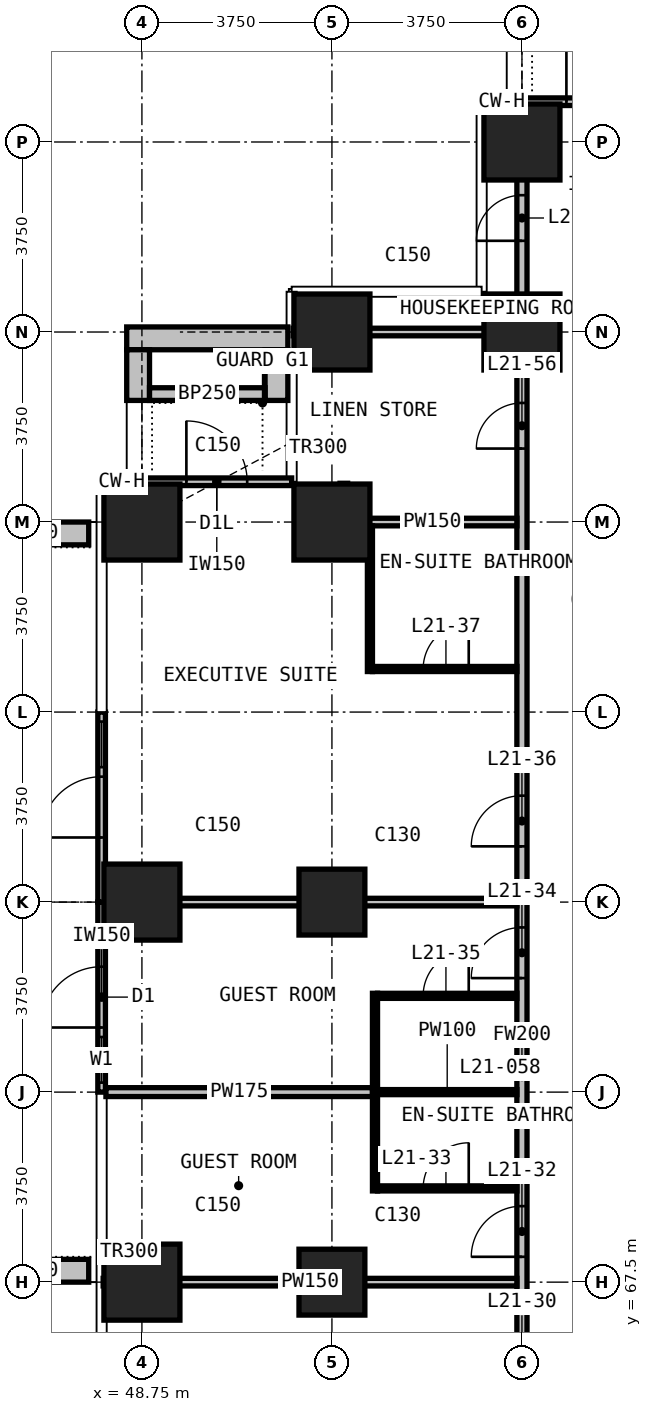
"""IFC4 building model, lengths in metres.
Left out: names, types, materials, properties, quantities, classifications, styles, units other than length and angle.
Written with IfcOpenShell. Run it as: python <this file> out.ifc"""

import sys

from ifc_helpers import new_model, si_unit, direction, frame, frame_2d, origin, origin_2d, place, context, subcontext, project, spatial, rectangle, extrude, element, fill, save


model = new_model("IFC4")
c1 = context("Model", 3, precision=1e-05, world=origin(), true_north=direction((0.0, 1.0)))
c2 = subcontext(c1, "Body", "Model", "MODEL_VIEW")
j1 = project(units=[si_unit("LENGTHUNIT", "METRE"), si_unit("PLANEANGLEUNIT", "RADIAN")], contexts=[c1])
p1 = place(None, origin())
s1 = spatial("IfcSite", under=j1, at=p1, CompositionType="ELEMENT")
p2 = place(p1, origin())
s2 = spatial("IfcBuilding", under=s1, at=p2, CompositionType="ELEMENT")
p3 = place(p2, frame((0.0, 0.0, 89.0)))
s3 = spatial("IfcBuildingStorey", under=s2, at=p3, CompositionType="ELEMENT", Elevation=89.0)
for number, where, z_axis, x_axis in (
    (1, (48.75, 67.5, 0.0), (0.0, 0.0, 1.0), (1.0, 0.0, 0.0)),
    (2, (48.75, 75.0, 0.0), (0.0, 0.0, 1.0), (1.0, 0.0, 0.0)),
    (3, (48.75, 82.5, 0.0), (0.0, 0.0, 1.0), (1.0, 0.0, 0.0)),
):
    element("IfcColumn", number, at=place(p3, frame(where, z_axis=z_axis, x_axis=x_axis)), inside=s3, PredefinedType="COLUMN", context=c2, shape_type="SweptSolid", body=[
        extrude(rectangle(XDim=1.5, YDim=1.5, at=origin_2d()), origin(), (0.0, 0.0, 1.0), 3.3),
    ])
for number, where, z_axis, x_axis in (
    (4, (52.5, 67.5, 0.0), (0.0, 0.0, 1.0), (1.0, 0.0, 0.0)),
    (5, (52.5, 75.0, 0.0), (0.0, 0.0, 1.0), (1.0, 0.0, 0.0)),
):
    element("IfcColumn", number, at=place(p3, frame(where, z_axis=z_axis, x_axis=x_axis)), inside=s3, PredefinedType="COLUMN", context=c2, shape_type="SweptSolid", body=[
        extrude(rectangle(XDim=1.3, YDim=1.3, at=origin_2d()), origin(), (0.0, 0.0, 1.0), 3.3),
    ])
for number, where, z_axis, x_axis in (
    (6, (52.5, 82.5, 0.0), (0.0, 0.0, 1.0), (1.0, 0.0, 0.0)),
    (7, (52.5, 86.25, 0.0), (0.0, 0.0, 1.0), (1.0, 0.0, 0.0)),
    (8, (56.25, 86.25, 0.0), (0.0, 0.0, 1.0), (1.0, 0.0, 0.0)),
    (9, (56.25, 90.0, 0.0), (0.0, 0.0, 1.0), (1.0, 0.0, 0.0)),
):
    element("IfcColumn", number, at=place(p3, frame(where, z_axis=z_axis, x_axis=x_axis)), inside=s3, PredefinedType="COLUMN", context=c2, shape_type="SweptSolid", body=[
        extrude(rectangle(XDim=1.5, YDim=1.5, at=origin_2d()), origin(), (0.0, 0.0, 1.0), 3.3),
    ])
p4 = place(p3, frame((56.25, 90.795, 0.0), z_axis=(0.0, 0.0, 1.0), x_axis=(1.0, 0.0, 0.0)))
e10 = element("IfcWall", 10, at=p4, inside=s3, PredefinedType="SOLIDWALL", context=c2, shape_type="SweptSolid", body=[
    extrude(rectangle(XDim=2.955, YDim=0.15, at=frame_2d((1.478, 0.0))), origin(), (0.0, 0.0, 1.0), 3.0),
])
p5 = place(p4, frame((0.877, 0.0, 0.0)))
e11 = element("IfcOpeningElement", 11, at=p5, cuts=e10, PredefinedType="OPENING", context=c2, shape_type="SweptSolid", body=[
    extrude(rectangle(XDim=1.2, YDim=2.4, at=frame_2d((0.6, 1.2))), frame((0.0, 0.085, 0.0), z_axis=(0.0, -1.0, 0.0), x_axis=(1.0, 0.0, 0.0)), (0.0, 0.0, 1.0), 0.17),
])
p6 = place(p3, frame((48.75, 83.295, 0.0), z_axis=(0.0, 0.0, 1.0), x_axis=(1.0, 0.0, 0.0)))
e12 = element("IfcWall", 12, at=p6, inside=s3, PredefinedType="SOLIDWALL", context=c2, shape_type="SweptSolid", body=[
    extrude(rectangle(XDim=2.955, YDim=0.15, at=frame_2d((1.478, 0.0))), origin(), (0.0, 0.0, 1.0), 3.0),
])
p7 = place(p6, frame((0.877, 0.0, 0.0)))
e13 = element("IfcOpeningElement", 13, at=p7, cuts=e12, PredefinedType="OPENING", context=c2, shape_type="SweptSolid", body=[
    extrude(rectangle(XDim=1.2, YDim=2.0, at=frame_2d((0.6, 1.0))), frame((0.0, 0.085, 0.0), z_axis=(0.0, -1.0, 0.0), x_axis=(1.0, 0.0, 0.0)), (0.0, 0.0, 1.0), 0.17),
])
p8 = place(p3, frame((47.955, 71.25, 0.0), z_axis=(0.0, 0.0, 1.0), x_axis=(0.0, 1.0, 0.0)))
e14 = element("IfcWall", 14, at=p8, inside=s3, PredefinedType="SOLIDWALL", context=c2, shape_type="SweptSolid", body=[
    extrude(rectangle(XDim=3.75, YDim=0.15, at=frame_2d((1.875, 0.0))), origin(), (0.0, 0.0, 1.0), 3.0),
])
p9 = place(p8, frame((0.188, 0.0, 0.1)))
e15 = element("IfcOpeningElement", 15, at=p9, cuts=e14, PredefinedType="OPENING", context=c2, shape_type="SweptSolid", body=[
    extrude(rectangle(XDim=0.9, YDim=2.4, at=frame_2d((0.45, 1.2))), frame((0.0, 0.085, 0.0), z_axis=(0.0, -1.0, 0.0), x_axis=(1.0, 0.0, 0.0)), (0.0, 0.0, 1.0), 0.17),
])
p10 = place(p8, frame((1.275, 0.0, 0.0)))
e16 = element("IfcOpeningElement", 16, at=p10, cuts=e14, PredefinedType="OPENING", context=c2, shape_type="SweptSolid", body=[
    extrude(rectangle(XDim=1.2, YDim=2.4, at=frame_2d((0.6, 1.2))), frame((0.0, 0.085, 0.0), z_axis=(0.0, -1.0, 0.0), x_axis=(1.0, 0.0, 0.0)), (0.0, 0.0, 1.0), 0.17),
])
p11 = place(p3, frame((47.955, 75.0, 0.0), z_axis=(0.0, 0.0, 1.0), x_axis=(0.0, 1.0, 0.0)))
e17 = element("IfcWall", 17, at=p11, inside=s3, PredefinedType="SOLIDWALL", context=c2, shape_type="SweptSolid", body=[
    extrude(rectangle(XDim=3.75, YDim=0.15, at=frame_2d((1.875, 0.0))), origin(), (0.0, 0.0, 1.0), 3.0),
])
p12 = place(p11, frame((1.275, 0.0, 0.0)))
e18 = element("IfcOpeningElement", 18, at=p12, cuts=e17, PredefinedType="OPENING", context=c2, shape_type="SweptSolid", body=[
    extrude(rectangle(XDim=1.2, YDim=2.4, at=frame_2d((0.6, 1.2))), frame((0.0, 0.085, 0.0), z_axis=(0.0, -1.0, 0.0), x_axis=(1.0, 0.0, 0.0)), (0.0, 0.0, 1.0), 0.17),
])
p13 = place(p11, frame((2.663, 0.0, 0.1)))
e19 = element("IfcOpeningElement", 19, at=p13, cuts=e17, PredefinedType="OPENING", context=c2, shape_type="SweptSolid", body=[
    extrude(rectangle(XDim=0.9, YDim=2.4, at=frame_2d((0.45, 1.2))), frame((0.0, 0.085, 0.0), z_axis=(0.0, -1.0, 0.0), x_axis=(1.0, 0.0, 0.0)), (0.0, 0.0, 1.0), 0.17),
])
p14 = place(p3, frame((48.45, 86.125, 0.0), z_axis=(0.0, 0.0, 1.0), x_axis=(1.0, 0.0, 0.0)))
e20 = element("IfcWall", 20, at=p14, inside=s3, PredefinedType="USERDEFINED", context=c2, shape_type="SweptSolid", body=[
    extrude(rectangle(XDim=3.18, YDim=0.45, at=frame_2d((1.59, 0.0))), origin(), (0.0, 0.0, 1.0), 1.1),
])
for number, where, z_axis, x_axis in (
    (21, (48.675, 84.9, 0.0), (0.0, 0.0, 1.0), (0.0, 1.0, 0.0)),
    (22, (51.405, 84.9, 0.0), (0.0, 0.0, 1.0), (0.0, 1.0, 0.0)),
):
    element("IfcWall", number, at=place(p3, frame(where, z_axis=z_axis, x_axis=x_axis)), inside=s3, PredefinedType="USERDEFINED", context=c2, shape_type="SweptSolid", body=[
        extrude(rectangle(XDim=1.0, YDim=0.45, at=frame_2d((0.5, 0.0))), origin(), (0.0, 0.0, 1.0), 1.1),
    ])
p15 = place(p3, frame((48.9, 85.025, 0.0), z_axis=(0.0, 0.0, 1.0), x_axis=(1.0, 0.0, 0.0)))
e23 = element("IfcWall", 23, at=p15, inside=s3, PredefinedType="USERDEFINED", context=c2, shape_type="SweptSolid", body=[
    extrude(rectangle(XDim=2.28, YDim=0.25, at=frame_2d((1.14, 0.0))), origin(), (0.0, 0.0, 1.0), 1.0),
])
for number, where, z_axis, x_axis in (
    (24, (47.7, 67.725, 0.0), (0.0, 0.0, 1.0), (-1.0, 0.0, 0.0)),
    (25, (47.7, 82.275, 0.0), (0.0, 0.0, 1.0), (-1.0, 0.0, 0.0)),
):
    element("IfcWall", number, at=place(p3, frame(where, z_axis=z_axis, x_axis=x_axis)), inside=s3, PredefinedType="USERDEFINED", context=c2, shape_type="SweptSolid", body=[
        extrude(rectangle(XDim=2.35, YDim=0.45, at=frame_2d((1.175, 0.0))), origin(), (0.0, 0.0, 1.0), 1.1),
    ])
p16 = place(p3, frame((56.25, 52.4, 0.0), z_axis=(0.0, 0.0, 1.0), x_axis=(0.0, 1.0, 0.0)))
e26 = element("IfcWall", 26, at=p16, inside=s3, PredefinedType="PARTITIONING", context=c2, shape_type="SweptSolid", body=[
    extrude(rectangle(XDim=38.31, YDim=0.2, at=frame_2d((19.155, 0.0))), origin(), (0.0, 0.0, 1.0), 3.0),
])
p17 = place(p16, frame((2.35, 0.0, 0.0)))
e27 = element("IfcOpeningElement", 27, at=p17, cuts=e26, PredefinedType="OPENING", context=c2, shape_type="SweptSolid", body=[
    extrude(rectangle(XDim=1.0, YDim=2.2, at=frame_2d((0.5, 1.1))), frame((0.0, 0.11, 0.0), z_axis=(0.0, -1.0, 0.0), x_axis=(1.0, 0.0, 0.0)), (0.0, 0.0, 1.0), 0.22),
])
p18 = place(p16, frame((4.35, 0.0, 0.0)))
e28 = element("IfcOpeningElement", 28, at=p18, cuts=e26, PredefinedType="OPENING", context=c2, shape_type="SweptSolid", body=[
    extrude(rectangle(XDim=1.0, YDim=2.2, at=frame_2d((0.5, 1.1))), frame((0.0, 0.11, 0.0), z_axis=(0.0, -1.0, 0.0), x_axis=(1.0, 0.0, 0.0)), (0.0, 0.0, 1.0), 0.22),
])
p19 = place(p16, frame((13.0, 0.0, 0.0)))
e29 = element("IfcOpeningElement", 29, at=p19, cuts=e26, PredefinedType="OPENING", context=c2, shape_type="SweptSolid", body=[
    extrude(rectangle(XDim=1.0, YDim=2.2, at=frame_2d((0.5, 1.1))), frame((0.0, 0.11, 0.0), z_axis=(0.0, -1.0, 0.0), x_axis=(1.0, 0.0, 0.0)), (0.0, 0.0, 1.0), 0.22),
])
p20 = place(p16, frame((15.6, 0.0, 0.0)))
e30 = element("IfcOpeningElement", 30, at=p20, cuts=e26, PredefinedType="OPENING", context=c2, shape_type="SweptSolid", body=[
    extrude(rectangle(XDim=1.0, YDim=2.2, at=frame_2d((0.5, 1.1))), frame((0.0, 0.11, 0.0), z_axis=(0.0, -1.0, 0.0), x_axis=(1.0, 0.0, 0.0)), (0.0, 0.0, 1.0), 0.22),
])
p21 = place(p16, frame((21.1, 0.0, 0.0)))
e31 = element("IfcOpeningElement", 31, at=p21, cuts=e26, PredefinedType="OPENING", context=c2, shape_type="SweptSolid", body=[
    extrude(rectangle(XDim=1.0, YDim=2.2, at=frame_2d((0.5, 1.1))), frame((0.0, 0.11, 0.0), z_axis=(0.0, -1.0, 0.0), x_axis=(1.0, 0.0, 0.0)), (0.0, 0.0, 1.0), 0.22),
])
p22 = place(p16, frame((23.7, 0.0, 0.0)))
e32 = element("IfcOpeningElement", 32, at=p22, cuts=e26, PredefinedType="OPENING", context=c2, shape_type="SweptSolid", body=[
    extrude(rectangle(XDim=1.0, YDim=2.2, at=frame_2d((0.5, 1.1))), frame((0.0, 0.11, 0.0), z_axis=(0.0, -1.0, 0.0), x_axis=(1.0, 0.0, 0.0)), (0.0, 0.0, 1.0), 0.22),
])
p23 = place(p16, frame((31.55, 0.0, 0.0)))
e33 = element("IfcOpeningElement", 33, at=p23, cuts=e26, PredefinedType="OPENING", context=c2, shape_type="SweptSolid", body=[
    extrude(rectangle(XDim=0.9, YDim=2.2, at=frame_2d((0.45, 1.1))), frame((0.0, 0.11, 0.0), z_axis=(0.0, -1.0, 0.0), x_axis=(1.0, 0.0, 0.0)), (0.0, 0.0, 1.0), 0.22),
])
p24 = place(p16, frame((35.65, 0.0, 0.0)))
e34 = element("IfcOpeningElement", 34, at=p24, cuts=e26, PredefinedType="OPENING", context=c2, shape_type="SweptSolid", body=[
    extrude(rectangle(XDim=0.9, YDim=2.2, at=frame_2d((0.45, 1.1))), frame((0.0, 0.11, 0.0), z_axis=(0.0, -1.0, 0.0), x_axis=(1.0, 0.0, 0.0)), (0.0, 0.0, 1.0), 0.22),
])
p25 = place(p3, frame((48.04, 71.25, 0.0), z_axis=(0.0, 0.0, 1.0), x_axis=(1.0, 0.0, 0.0)))
e35 = element("IfcWall", 35, at=p25, inside=s3, PredefinedType="PARTITIONING", context=c2, shape_type="SweptSolid", body=[
    extrude(rectangle(XDim=5.26, YDim=0.175, at=frame_2d((2.63, 0.0))), origin(), (0.0, 0.0, 1.0), 3.0),
])
p26 = place(p3, frame((47.985, 67.5, 0.0), z_axis=(0.0, 0.0, 1.0), x_axis=(1.0, 0.0, 0.0)))
e36 = element("IfcWall", 36, at=p26, inside=s3, PredefinedType="PARTITIONING", context=c2, shape_type="SweptSolid", body=[
    extrude(rectangle(XDim=8.165, YDim=0.15, at=frame_2d((4.083, 0.0))), origin(), (0.0, 0.0, 1.0), 3.0),
])
p27 = place(p3, frame((48.04, 75.0, 0.0), z_axis=(0.0, 0.0, 1.0), x_axis=(1.0, 0.0, 0.0)))
e37 = element("IfcWall", 37, at=p27, inside=s3, PredefinedType="PARTITIONING", context=c2, shape_type="SweptSolid", body=[
    extrude(rectangle(XDim=8.11, YDim=0.15, at=frame_2d((4.055, 0.0))), origin(), (0.0, 0.0, 1.0), 3.0),
])
p28 = place(p3, frame((52.81, 82.5, 0.0), z_axis=(0.0, 0.0, 1.0), x_axis=(1.0, 0.0, 0.0)))
e38 = element("IfcWall", 38, at=p28, inside=s3, PredefinedType="PARTITIONING", context=c2, shape_type="SweptSolid", body=[
    extrude(rectangle(XDim=3.34, YDim=0.15, at=frame_2d((1.67, 0.0))), origin(), (0.0, 0.0, 1.0), 3.0),
])
p29 = place(p3, frame((51.735, 86.25, 0.0), z_axis=(0.0, 0.0, 1.0), x_axis=(1.0, 0.0, 0.0)))
e39 = element("IfcWall", 39, at=p29, inside=s3, PredefinedType="PARTITIONING", context=c2, shape_type="SweptSolid", body=[
    extrude(rectangle(XDim=4.415, YDim=0.15, at=frame_2d((2.208, 0.0))), origin(), (0.0, 0.0, 1.0), 3.0),
])
p30 = place(p3, frame((52.735, 82.425, 0.0), z_axis=(0.0, 0.0, 1.0), x_axis=(0.0, 1.0, 0.0)))
e40 = element("IfcWall", 40, at=p30, inside=s3, PredefinedType="PARTITIONING", context=c2, shape_type="SweptSolid", body=[
    extrude(rectangle(XDim=0.84, YDim=0.15, at=frame_2d((0.42, 0.0))), origin(), (0.0, 0.0, 1.0), 3.0),
])
p31 = place(p3, frame((53.4, 69.35, 0.0), z_axis=(0.0, 0.0, 1.0), x_axis=(1.0, 0.0, 0.0)))
e41 = element("IfcWall", 41, at=p31, inside=s3, PredefinedType="PARTITIONING", context=c2, shape_type="SweptSolid", body=[
    extrude(rectangle(XDim=2.75, YDim=0.1, at=frame_2d((1.375, 0.0))), origin(), (0.0, 0.0, 1.0), 3.0),
])
p32 = place(p31, frame((0.9, 0.0, 0.0)))
e42 = element("IfcOpeningElement", 42, at=p32, cuts=e41, PredefinedType="OPENING", context=c2, shape_type="SweptSolid", body=[
    extrude(rectangle(XDim=0.9, YDim=2.2, at=frame_2d((0.45, 1.1))), frame((0.0, 0.06, 0.0), z_axis=(0.0, -1.0, 0.0), x_axis=(1.0, 0.0, 0.0)), (0.0, 0.0, 1.0), 0.12),
])
p33 = place(p3, frame((53.4, 71.25, 0.0), z_axis=(0.0, 0.0, 1.0), x_axis=(1.0, 0.0, 0.0)))
e43 = element("IfcWall", 43, at=p33, inside=s3, PredefinedType="PARTITIONING", context=c2, shape_type="SweptSolid", body=[
    extrude(rectangle(XDim=2.75, YDim=0.1, at=frame_2d((1.375, 0.0))), origin(), (0.0, 0.0, 1.0), 3.0),
])
p34 = place(p3, frame((53.4, 73.15, 0.0), z_axis=(0.0, 0.0, 1.0), x_axis=(1.0, 0.0, 0.0)))
e44 = element("IfcWall", 44, at=p34, inside=s3, PredefinedType="PARTITIONING", context=c2, shape_type="SweptSolid", body=[
    extrude(rectangle(XDim=2.75, YDim=0.1, at=frame_2d((1.375, 0.0))), origin(), (0.0, 0.0, 1.0), 3.0),
])
p35 = place(p34, frame((0.9, 0.0, 0.0)))
e45 = element("IfcOpeningElement", 45, at=p35, cuts=e44, PredefinedType="OPENING", context=c2, shape_type="SweptSolid", body=[
    extrude(rectangle(XDim=0.9, YDim=2.2, at=frame_2d((0.45, 1.1))), frame((0.0, 0.06, 0.0), z_axis=(0.0, -1.0, 0.0), x_axis=(1.0, 0.0, 0.0)), (0.0, 0.0, 1.0), 0.12),
])
p36 = place(p3, frame((53.3, 79.6, 0.0), z_axis=(0.0, 0.0, 1.0), x_axis=(1.0, 0.0, 0.0)))
e46 = element("IfcWall", 46, at=p36, inside=s3, PredefinedType="PARTITIONING", context=c2, shape_type="SweptSolid", body=[
    extrude(rectangle(XDim=2.85, YDim=0.1, at=frame_2d((1.425, 0.0))), origin(), (0.0, 0.0, 1.0), 3.0),
])
p37 = place(p36, frame((1.0, 0.0, 0.0)))
e47 = element("IfcOpeningElement", 47, at=p37, cuts=e46, PredefinedType="OPENING", context=c2, shape_type="SweptSolid", body=[
    extrude(rectangle(XDim=0.9, YDim=2.2, at=frame_2d((0.45, 1.1))), frame((0.0, 0.06, 0.0), z_axis=(0.0, -1.0, 0.0), x_axis=(1.0, 0.0, 0.0)), (0.0, 0.0, 1.0), 0.12),
])
p38 = place(p3, frame((53.25, 79.55, 0.0), z_axis=(0.0, 0.0, 1.0), x_axis=(0.0, 1.0, 0.0)))
e48 = element("IfcWall", 48, at=p38, inside=s3, PredefinedType="PARTITIONING", context=c2, shape_type="SweptSolid", body=[
    extrude(rectangle(XDim=2.875, YDim=0.1, at=frame_2d((1.438, 0.0))), origin(), (0.0, 0.0, 1.0), 3.0),
])
p39 = place(p3, frame((53.35, 69.3, 0.0), z_axis=(0.0, 0.0, 1.0), x_axis=(0.0, 1.0, 0.0)))
e49 = element("IfcWall", 49, at=p39, inside=s3, PredefinedType="PARTITIONING", context=c2, shape_type="SweptSolid", body=[
    extrude(rectangle(XDim=3.9, YDim=0.1, at=frame_2d((1.95, 0.0))), origin(), (0.0, 0.0, 1.0), 3.0),
])
p40 = place(p5, origin())
e50 = element("IfcDoor", 50, at=p40, inside=s3, OperationType="SINGLE_SWING_LEFT", PredefinedType="DOOR", context=c2, shape_type="SweptSolid", body=[
    extrude(rectangle(XDim=1.2, YDim=2.4, at=frame_2d((0.6, 1.2))), frame((0.0, 0.025, 0.0), z_axis=(0.0, -1.0, 0.0), x_axis=(1.0, 0.0, 0.0)), (0.0, 0.0, 1.0), 0.05),
])
fill(e11, e50)
p41 = place(p7, origin())
e51 = element("IfcDoor", 51, at=p41, inside=s3, OperationType="SINGLE_SWING_LEFT", PredefinedType="DOOR", context=c2, shape_type="SweptSolid", body=[
    extrude(rectangle(XDim=1.2, YDim=2.0, at=frame_2d((0.6, 1.0))), frame((0.0, 0.025, 0.0), z_axis=(0.0, -1.0, 0.0), x_axis=(1.0, 0.0, 0.0)), (0.0, 0.0, 1.0), 0.05),
])
fill(e13, e51)
p42 = place(p9, origin())
e52 = element("IfcWindow", 52, at=p42, inside=s3, PartitioningType="SINGLE_PANEL", PredefinedType="WINDOW", context=c2, shape_type="SweptSolid", body=[
    extrude(rectangle(XDim=0.9, YDim=2.4, at=frame_2d((0.45, 1.2))), frame((0.0, 0.03, 0.0), z_axis=(0.0, -1.0, 0.0), x_axis=(1.0, 0.0, 0.0)), (0.0, 0.0, 1.0), 0.06),
])
fill(e15, e52)
p43 = place(p10, origin())
e53 = element("IfcDoor", 53, at=p43, inside=s3, OperationType="SINGLE_SWING_LEFT", PredefinedType="DOOR", context=c2, shape_type="SweptSolid", body=[
    extrude(rectangle(XDim=1.2, YDim=2.4, at=frame_2d((0.6, 1.2))), frame((0.0, 0.025, 0.0), z_axis=(0.0, -1.0, 0.0), x_axis=(1.0, 0.0, 0.0)), (0.0, 0.0, 1.0), 0.05),
])
fill(e16, e53)
p44 = place(p12, origin())
e54 = element("IfcDoor", 54, at=p44, inside=s3, OperationType="SINGLE_SWING_LEFT", PredefinedType="DOOR", context=c2, shape_type="SweptSolid", body=[
    extrude(rectangle(XDim=1.2, YDim=2.4, at=frame_2d((0.6, 1.2))), frame((0.0, 0.025, 0.0), z_axis=(0.0, -1.0, 0.0), x_axis=(1.0, 0.0, 0.0)), (0.0, 0.0, 1.0), 0.05),
])
fill(e18, e54)
p45 = place(p13, origin())
e55 = element("IfcWindow", 55, at=p45, inside=s3, PartitioningType="SINGLE_PANEL", PredefinedType="WINDOW", context=c2, shape_type="SweptSolid", body=[
    extrude(rectangle(XDim=0.9, YDim=2.4, at=frame_2d((0.45, 1.2))), frame((0.0, 0.03, 0.0), z_axis=(0.0, -1.0, 0.0), x_axis=(1.0, 0.0, 0.0)), (0.0, 0.0, 1.0), 0.06),
])
fill(e19, e55)
p46 = place(p20, origin())
e56 = element("IfcDoor", 56, at=p46, inside=s3, OperationType="SINGLE_SWING_RIGHT", PredefinedType="DOOR", context=c2, shape_type="SweptSolid", body=[
    extrude(rectangle(XDim=1.0, YDim=2.2, at=frame_2d((0.5, 1.1))), frame((0.0, 0.025, 0.0), z_axis=(0.0, -1.0, 0.0), x_axis=(1.0, 0.0, 0.0)), (0.0, 0.0, 1.0), 0.05),
])
fill(e30, e56)
p47 = place(p32, origin())
e57 = element("IfcDoor", 57, at=p47, inside=s3, OperationType="SINGLE_SWING_RIGHT", PredefinedType="DOOR", context=c2, shape_type="SweptSolid", body=[
    extrude(rectangle(XDim=0.9, YDim=2.2, at=frame_2d((0.45, 1.1))), frame((0.0, 0.025, 0.0), z_axis=(0.0, -1.0, 0.0), x_axis=(1.0, 0.0, 0.0)), (0.0, 0.0, 1.0), 0.05),
])
fill(e42, e57)
p48 = place(p21, origin())
e58 = element("IfcDoor", 58, at=p48, inside=s3, OperationType="SINGLE_SWING_LEFT", PredefinedType="DOOR", context=c2, shape_type="SweptSolid", body=[
    extrude(rectangle(XDim=1.0, YDim=2.2, at=frame_2d((0.5, 1.1))), frame((0.0, 0.025, 0.0), z_axis=(0.0, -1.0, 0.0), x_axis=(1.0, 0.0, 0.0)), (0.0, 0.0, 1.0), 0.05),
])
fill(e31, e58)
p49 = place(p35, origin())
e59 = element("IfcDoor", 59, at=p49, inside=s3, OperationType="SINGLE_SWING_RIGHT", PredefinedType="DOOR", context=c2, shape_type="SweptSolid", body=[
    extrude(rectangle(XDim=0.9, YDim=2.2, at=frame_2d((0.45, 1.1))), frame((0.0, 0.025, 0.0), z_axis=(0.0, -1.0, 0.0), x_axis=(1.0, 0.0, 0.0)), (0.0, 0.0, 1.0), 0.05),
])
fill(e45, e59)
p50 = place(p22, origin())
e60 = element("IfcDoor", 60, at=p50, inside=s3, OperationType="SINGLE_SWING_RIGHT", PredefinedType="DOOR", context=c2, shape_type="SweptSolid", body=[
    extrude(rectangle(XDim=1.0, YDim=2.2, at=frame_2d((0.5, 1.1))), frame((0.0, 0.025, 0.0), z_axis=(0.0, -1.0, 0.0), x_axis=(1.0, 0.0, 0.0)), (0.0, 0.0, 1.0), 0.05),
])
fill(e32, e60)
p51 = place(p37, origin())
e61 = element("IfcDoor", 61, at=p51, inside=s3, OperationType="SINGLE_SWING_RIGHT", PredefinedType="DOOR", context=c2, shape_type="SweptSolid", body=[
    extrude(rectangle(XDim=0.9, YDim=2.2, at=frame_2d((0.45, 1.1))), frame((0.0, 0.025, 0.0), z_axis=(0.0, -1.0, 0.0), x_axis=(1.0, 0.0, 0.0)), (0.0, 0.0, 1.0), 0.05),
])
fill(e47, e61)
p52 = place(p23, origin())
e62 = element("IfcDoor", 62, at=p52, inside=s3, OperationType="SINGLE_SWING_RIGHT", PredefinedType="DOOR", context=c2, shape_type="SweptSolid", body=[
    extrude(rectangle(XDim=0.9, YDim=2.2, at=frame_2d((0.45, 1.1))), frame((0.0, 0.025, 0.0), z_axis=(0.0, -1.0, 0.0), x_axis=(1.0, 0.0, 0.0)), (0.0, 0.0, 1.0), 0.05),
])
fill(e33, e62)
p53 = place(p24, origin())
e63 = element("IfcDoor", 63, at=p53, inside=s3, OperationType="SINGLE_SWING_LEFT", PredefinedType="DOOR", context=c2, shape_type="SweptSolid", body=[
    extrude(rectangle(XDim=0.9, YDim=2.2, at=frame_2d((0.45, 1.1))), frame((0.0, 0.025, 0.0), z_axis=(0.0, -1.0, 0.0), x_axis=(1.0, 0.0, 0.0)), (0.0, 0.0, 1.0), 0.05),
])
fill(e34, e63)
save(model, sys.argv[1])
